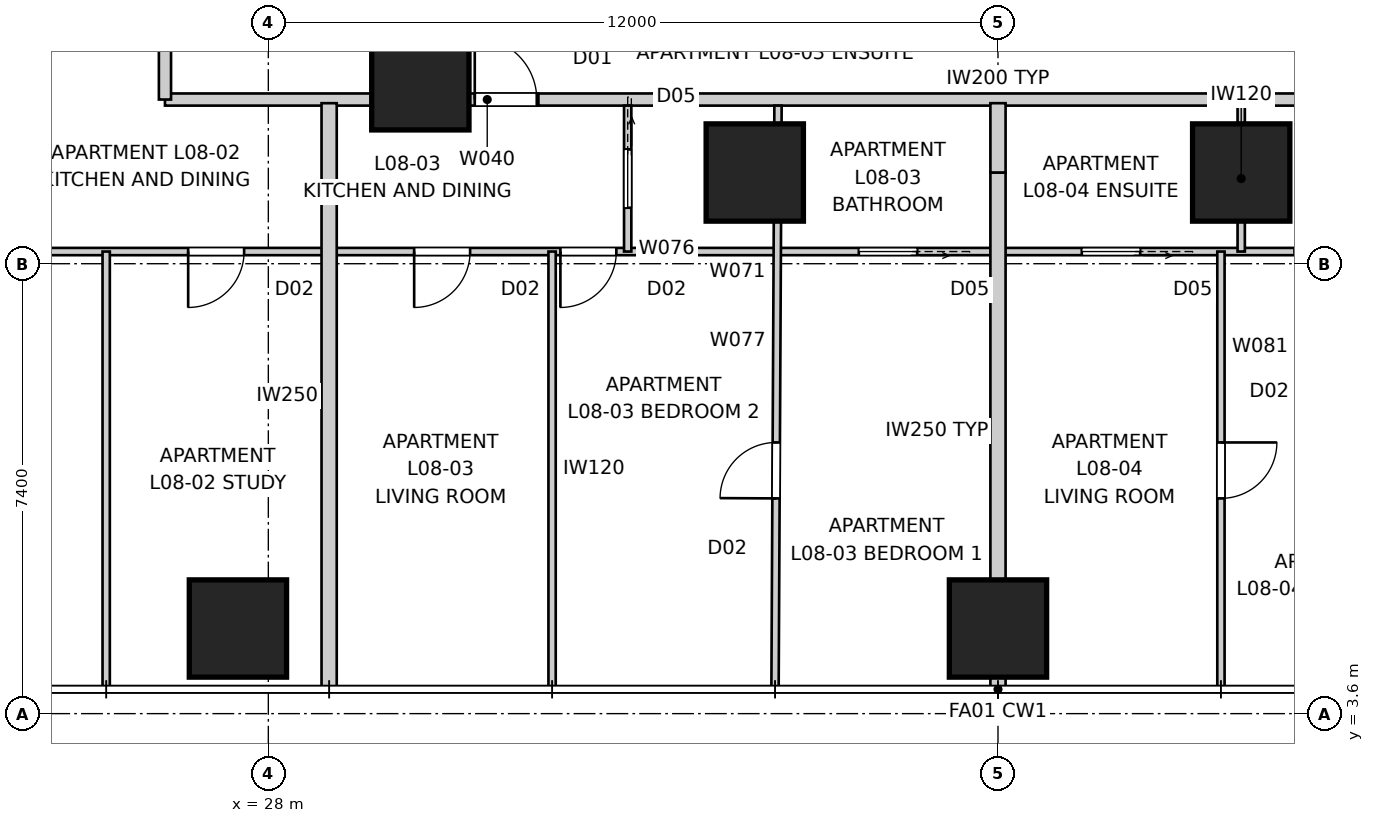
"""IFC4 building model, lengths in metres.
Left out: names, types, materials, properties, quantities, classifications, styles, units other than length and angle.
Written with IfcOpenShell. Run it as: python <this file> out.ifc"""

import sys

from ifc_helpers import new_model, si_unit, direction, frame, frame_2d, origin, origin_2d, place, context, subcontext, project, spatial, rectangle, extrude, element, fill, save


model = new_model("IFC4")
c1 = context("Model", 3, precision=1e-05, world=origin(), true_north=direction((0.0, 1.0)))
c2 = subcontext(c1, "Body", "Model", "MODEL_VIEW")
j1 = project(units=[si_unit("LENGTHUNIT", "METRE"), si_unit("PLANEANGLEUNIT", "RADIAN")], contexts=[c1])
p1 = place(None, origin())
s1 = spatial("IfcSite", under=j1, at=p1, CompositionType="ELEMENT")
p2 = place(p1, origin())
s2 = spatial("IfcBuilding", under=s1, at=p2, CompositionType="ELEMENT")
p3 = place(p2, frame((0.0, 0.0, 32.0)))
s3 = spatial("IfcBuildingStorey", under=s2, at=p3, CompositionType="ELEMENT", Elevation=32.0)
for number, where, z_axis, x_axis in (
    (1, (27.5, 5.0, 0.0), (0.0, 0.0, 1.0), (1.0, 0.0, 0.0)),
    (2, (40.0, 5.0, 0.0), (0.0, 0.0, 1.0), (1.0, 0.0, 0.0)),
    (3, (30.5, 14.0, 0.0), (0.0, 0.0, 1.0), (1.0, 0.0, 0.0)),
    (4, (36.0, 12.5, 0.0), (0.0, 0.0, 1.0), (1.0, 0.0, 0.0)),
    (5, (44.0, 12.5, 0.0), (0.0, 0.0, 1.0), (1.0, 0.0, 0.0)),
):
    element("IfcColumn", number, at=place(p3, frame(where, z_axis=z_axis, x_axis=x_axis)), inside=s3, PredefinedType="COLUMN", context=c2, shape_type="SweptSolid", body=[
        extrude(rectangle(XDim=1.6, YDim=1.6, at=origin_2d()), origin(), (0.0, 0.0, 1.0), 3.4),
    ])
p4 = place(p3, frame((26.3, 13.7, 0.0), z_axis=(0.0, 0.0, 1.0), x_axis=(1.0, 0.0, 0.0)))
e6 = element("IfcWall", 6, at=p4, inside=s3, PredefinedType="PARTITIONING", context=c2, shape_type="SweptSolid", body=[
    extrude(rectangle(XDim=4.458, YDim=0.2, at=frame_2d((2.229, 0.0))), origin(), (0.0, 0.0, 1.0), 3.25),
])
p5 = place(p3, frame((30.758, 13.7, 0.0), z_axis=(0.0, 0.0, 1.0), x_axis=(1.0, 0.0, 0.0)))
e7 = element("IfcWall", 7, at=p5, inside=s3, PredefinedType="PARTITIONING", context=c2, shape_type="SweptSolid", body=[
    extrude(rectangle(XDim=1.683, YDim=0.2, at=frame_2d((0.842, 0.0))), origin(), (0.0, 0.0, 1.0), 2.55),
])
p6 = place(p5, frame((0.637, 0.0, 0.0)))
e8 = element("IfcOpeningElement", 8, at=p6, cuts=e7, PredefinedType="OPENING", context=c2, shape_type="SweptSolid", body=[
    extrude(rectangle(XDim=1.02, YDim=2.34, at=frame_2d((0.51, 1.17))), frame((0.0, 0.11, 0.0), z_axis=(0.0, -1.0, 0.0), x_axis=(1.0, 0.0, 0.0)), (0.0, 0.0, 1.0), 0.22),
])
p7 = place(p3, frame((32.442, 13.7, 0.0), z_axis=(0.0, 0.0, 1.0), x_axis=(1.0, 0.0, 0.0)))
e9 = element("IfcWall", 9, at=p7, inside=s3, PredefinedType="PARTITIONING", context=c2, shape_type="SweptSolid", body=[
    extrude(rectangle(XDim=15.117, YDim=0.2, at=frame_2d((7.558, 0.0))), origin(), (0.0, 0.0, 1.0), 3.25),
])
p8 = place(p3, frame((26.3, 46.3, 0.0), z_axis=(0.0, 0.0, 1.0), x_axis=(0.0, -1.0, 0.0)))
e10 = element("IfcWall", 10, at=p8, inside=s3, PredefinedType="PARTITIONING", context=c2, shape_type="SweptSolid", body=[
    extrude(rectangle(XDim=32.6, YDim=0.2, at=frame_2d((16.3, 0.0))), origin(), (0.0, 0.0, 1.0), 3.25),
])
p9 = place(p8, frame((2.315, 0.0, 0.0)))
e11 = element("IfcOpeningElement", 11, at=p9, cuts=e10, PredefinedType="OPENING", context=c2, shape_type="SweptSolid", body=[
    extrude(rectangle(XDim=1.02, YDim=2.34, at=frame_2d((0.51, 1.17))), frame((0.0, 0.11, 0.0), z_axis=(0.0, -1.0, 0.0), x_axis=(1.0, 0.0, 0.0)), (0.0, 0.0, 1.0), 0.22),
])
p10 = place(p8, frame((10.624, 0.0, 0.0)))
e12 = element("IfcOpeningElement", 12, at=p10, cuts=e10, PredefinedType="OPENING", context=c2, shape_type="SweptSolid", body=[
    extrude(rectangle(XDim=1.02, YDim=2.34, at=frame_2d((0.51, 1.17))), frame((0.0, 0.11, 0.0), z_axis=(0.0, -1.0, 0.0), x_axis=(1.0, 0.0, 0.0)), (0.0, 0.0, 1.0), 0.22),
])
p11 = place(p8, frame((17.848, 0.0, 0.0)))
e13 = element("IfcOpeningElement", 13, at=p11, cuts=e10, PredefinedType="OPENING", context=c2, shape_type="SweptSolid", body=[
    extrude(rectangle(XDim=1.02, YDim=2.34, at=frame_2d((0.51, 1.17))), frame((0.0, 0.11, 0.0), z_axis=(0.0, -1.0, 0.0), x_axis=(1.0, 0.0, 0.0)), (0.0, 0.0, 1.0), 0.22),
])
p12 = place(p8, frame((30.516, 0.0, 0.0)))
e14 = element("IfcOpeningElement", 14, at=p12, cuts=e10, PredefinedType="OPENING", context=c2, shape_type="SweptSolid", body=[
    extrude(rectangle(XDim=1.02, YDim=2.34, at=frame_2d((0.51, 1.17))), frame((0.0, 0.11, 0.0), z_axis=(0.0, -1.0, 0.0), x_axis=(1.0, 0.0, 0.0)), (0.0, 0.0, 1.0), 0.22),
])
p13 = place(p3, frame((29.0, 4.0, 0.0), z_axis=(0.0, 0.0, 1.0), x_axis=(0.0, 1.0, 0.0)))
e15 = element("IfcWall", 15, at=p13, inside=s3, PredefinedType="PARTITIONING", context=c2, shape_type="SweptSolid", body=[
    extrude(rectangle(XDim=9.64, YDim=0.25, at=frame_2d((4.82, 0.0))), origin(), (0.0, 0.0, 1.0), 3.25),
])
p14 = place(p3, frame((40.0, 4.0, 0.0), z_axis=(0.0, 0.0, 1.0), x_axis=(0.0, 1.0, 0.0)))
e16 = element("IfcWall", 16, at=p14, inside=s3, PredefinedType="PARTITIONING", context=c2, shape_type="SweptSolid", body=[
    extrude(rectangle(XDim=8.5, YDim=0.25, at=frame_2d((4.25, 0.0))), origin(), (0.0, 0.0, 1.0), 3.25),
])
p15 = place(p3, frame((40.0, 12.5, 0.0), z_axis=(0.0, 0.0, 1.0), x_axis=(0.0, 1.0, 0.0)))
e17 = element("IfcWall", 17, at=p15, inside=s3, PredefinedType="PARTITIONING", context=c2, shape_type="SweptSolid", body=[
    extrude(rectangle(XDim=1.14, YDim=0.25, at=frame_2d((0.57, 0.0))), origin(), (0.0, 0.0, 1.0), 2.796),
])
p16 = place(p3, frame((54.667, 11.2, 0.0), z_axis=(0.0, 0.0, 1.0), x_axis=(-1.0, 0.0, 0.0)))
e18 = element("IfcWall", 18, at=p16, inside=s3, PredefinedType="PARTITIONING", context=c2, shape_type="SweptSolid", body=[
    extrude(rectangle(XDim=30.867, YDim=0.12, at=frame_2d((15.433, 0.0))), origin(), (0.0, 0.0, 1.0), 3.25),
])
p17 = place(p16, frame((23.348, 0.0, 0.0)))
e19 = element("IfcOpeningElement", 19, at=p17, cuts=e18, PredefinedType="OPENING", context=c2, shape_type="SweptSolid", body=[
    extrude(rectangle(XDim=0.92, YDim=2.34, at=frame_2d((0.46, 1.17))), frame((0.0, 0.07, 0.0), z_axis=(0.0, -1.0, 0.0), x_axis=(1.0, 0.0, 0.0)), (0.0, 0.0, 1.0), 0.14),
])
p18 = place(p16, frame((20.943, 0.0, 0.0)))
e20 = element("IfcOpeningElement", 20, at=p18, cuts=e18, PredefinedType="OPENING", context=c2, shape_type="SweptSolid", body=[
    extrude(rectangle(XDim=0.92, YDim=2.34, at=frame_2d((0.46, 1.17))), frame((0.0, 0.07, 0.0), z_axis=(0.0, -1.0, 0.0), x_axis=(1.0, 0.0, 0.0)), (0.0, 0.0, 1.0), 0.14),
])
p19 = place(p16, frame((5.065, 0.0, 0.0)))
e21 = element("IfcOpeningElement", 21, at=p19, cuts=e18, PredefinedType="OPENING", context=c2, shape_type="SweptSolid", body=[
    extrude(rectangle(XDim=0.92, YDim=2.34, at=frame_2d((0.46, 1.17))), frame((0.0, 0.07, 0.0), z_axis=(0.0, -1.0, 0.0), x_axis=(1.0, 0.0, 0.0)), (0.0, 0.0, 1.0), 0.14),
])
p20 = place(p16, frame((27.065, 0.0, 0.0)))
e22 = element("IfcOpeningElement", 22, at=p20, cuts=e18, PredefinedType="OPENING", context=c2, shape_type="SweptSolid", body=[
    extrude(rectangle(XDim=0.92, YDim=2.34, at=frame_2d((0.46, 1.17))), frame((0.0, 0.07, 0.0), z_axis=(0.0, -1.0, 0.0), x_axis=(1.0, 0.0, 0.0)), (0.0, 0.0, 1.0), 0.14),
])
p21 = place(p16, frame((1.353, 0.0, 0.0)))
e23 = element("IfcOpeningElement", 23, at=p21, cuts=e18, PredefinedType="OPENING", context=c2, shape_type="SweptSolid", body=[
    extrude(rectangle(XDim=0.96, YDim=2.1, at=frame_2d((0.48, 1.05))), frame((0.0, 0.07, 0.0), z_axis=(0.0, -1.0, 0.0), x_axis=(1.0, 0.0, 0.0)), (0.0, 0.0, 1.0), 0.14),
])
p22 = place(p16, frame((8.83, 0.0, 0.0)))
e24 = element("IfcOpeningElement", 24, at=p22, cuts=e18, PredefinedType="OPENING", context=c2, shape_type="SweptSolid", body=[
    extrude(rectangle(XDim=0.96, YDim=2.1, at=frame_2d((0.48, 1.05))), frame((0.0, 0.07, 0.0), z_axis=(0.0, -1.0, 0.0), x_axis=(1.0, 0.0, 0.0)), (0.0, 0.0, 1.0), 0.14),
])
p23 = place(p16, frame((12.328, 0.0, 0.0)))
e25 = element("IfcOpeningElement", 25, at=p23, cuts=e18, PredefinedType="OPENING", context=c2, shape_type="SweptSolid", body=[
    extrude(rectangle(XDim=0.96, YDim=2.1, at=frame_2d((0.48, 1.05))), frame((0.0, 0.07, 0.0), z_axis=(0.0, -1.0, 0.0), x_axis=(1.0, 0.0, 0.0)), (0.0, 0.0, 1.0), 0.14),
])
p24 = place(p16, frame((15.996, 0.0, 0.0)))
e26 = element("IfcOpeningElement", 26, at=p24, cuts=e18, PredefinedType="OPENING", context=c2, shape_type="SweptSolid", body=[
    extrude(rectangle(XDim=0.96, YDim=2.1, at=frame_2d((0.48, 1.05))), frame((0.0, 0.07, 0.0), z_axis=(0.0, -1.0, 0.0), x_axis=(1.0, 0.0, 0.0)), (0.0, 0.0, 1.0), 0.14),
])
p25 = place(p3, frame((25.333, 11.2, 0.0), z_axis=(0.0, 0.0, 1.0), x_axis=(0.0, -1.0, 0.0)))
e27 = element("IfcWall", 27, at=p25, inside=s3, PredefinedType="PARTITIONING", context=c2, shape_type="SweptSolid", body=[
    extrude(rectangle(XDim=7.16, YDim=0.12, at=frame_2d((3.58, 0.0))), origin(), (0.0, 0.0, 1.0), 2.638),
])
p26 = place(p3, frame((33.91, 13.6, 0.0), z_axis=(0.0, 0.0, 1.0), x_axis=(0.0, -1.0, 0.0)))
e28 = element("IfcWall", 28, at=p26, inside=s3, PredefinedType="PARTITIONING", context=c2, shape_type="SweptSolid", body=[
    extrude(rectangle(XDim=2.4, YDim=0.12, at=frame_2d((1.2, 0.0))), origin(), (0.0, 0.0, 1.0), 3.25),
])
p27 = place(p26, frame((0.72, 0.0, 0.0)))
e29 = element("IfcOpeningElement", 29, at=p27, cuts=e28, PredefinedType="OPENING", context=c2, shape_type="SweptSolid", body=[
    extrude(rectangle(XDim=0.96, YDim=2.1, at=frame_2d((0.48, 1.05))), frame((0.0, 0.07, 0.0), z_axis=(0.0, -1.0, 0.0), x_axis=(1.0, 0.0, 0.0)), (0.0, 0.0, 1.0), 0.14),
])
p28 = place(p3, frame((36.333, 4.04, 0.0), z_axis=(0.0, 0.0, 1.0), x_axis=(0.005107446534, 0.99998695691, 0.0)))
e30 = element("IfcWall", 30, at=p28, inside=s3, PredefinedType="PARTITIONING", context=c2, shape_type="SweptSolid", body=[
    extrude(rectangle(XDim=9.56, YDim=0.12, at=frame_2d((4.78, 0.0))), origin(), (0.0, 0.0, 1.0), 3.25),
])
p29 = place(p28, frame((3.1, 0.0, 0.0)))
e31 = element("IfcOpeningElement", 31, at=p29, cuts=e30, PredefinedType="OPENING", context=c2, shape_type="SweptSolid", body=[
    extrude(rectangle(XDim=0.92, YDim=2.34, at=frame_2d((0.46, 1.17))), frame((0.0, 0.07, 0.0), z_axis=(0.0, -1.0, 0.0), x_axis=(1.0, 0.0, 0.0)), (0.0, 0.0, 1.0), 0.14),
])
p30 = place(p3, frame((32.667, 11.2, 0.0), z_axis=(0.0, 0.0, 1.0), x_axis=(0.0, -1.0, 0.0)))
e32 = element("IfcWall", 32, at=p30, inside=s3, PredefinedType="PARTITIONING", context=c2, shape_type="SweptSolid", body=[
    extrude(rectangle(XDim=7.16, YDim=0.12, at=frame_2d((3.58, 0.0))), origin(), (0.0, 0.0, 1.0), 3.25),
])
p31 = place(p3, frame((44.0, 11.2, 0.0), z_axis=(0.0, 0.0, 1.0), x_axis=(0.0, 1.0, 0.0)))
e33 = element("IfcWall", 33, at=p31, inside=s3, PredefinedType="PARTITIONING", context=c2, shape_type="SweptSolid", body=[
    extrude(rectangle(XDim=2.4, YDim=0.12, at=frame_2d((1.2, 0.0))), origin(), (0.0, 0.0, 1.0), 3.25),
])
p32 = place(p3, frame((43.667, 11.2, 0.0), z_axis=(0.0, 0.0, 1.0), x_axis=(0.0, -1.0, 0.0)))
e34 = element("IfcWall", 34, at=p32, inside=s3, PredefinedType="PARTITIONING", context=c2, shape_type="SweptSolid", body=[
    extrude(rectangle(XDim=7.16, YDim=0.12, at=frame_2d((3.58, 0.0))), origin(), (0.0, 0.0, 1.0), 3.25),
])
p33 = place(p32, frame((3.14, 0.0, 0.0)))
e35 = element("IfcOpeningElement", 35, at=p33, cuts=e34, PredefinedType="OPENING", context=c2, shape_type="SweptSolid", body=[
    extrude(rectangle(XDim=0.92, YDim=2.34, at=frame_2d((0.46, 1.17))), frame((0.0, 0.07, 0.0), z_axis=(0.0, -1.0, 0.0), x_axis=(1.0, 0.0, 0.0)), (0.0, 0.0, 1.0), 0.14),
])
p34 = place(p6, origin())
e36 = element("IfcDoor", 36, at=p34, inside=s3, OperationType="SINGLE_SWING_LEFT", PredefinedType="DOOR", context=c2, shape_type="SweptSolid", body=[
    extrude(rectangle(XDim=1.02, YDim=2.34, at=frame_2d((0.51, 1.17))), frame((0.0, 0.025, 0.0), z_axis=(0.0, -1.0, 0.0), x_axis=(1.0, 0.0, 0.0)), (0.0, 0.0, 1.0), 0.05),
])
fill(e8, e36)
p35 = place(p17, origin())
e37 = element("IfcDoor", 37, at=p35, inside=s3, OperationType="SINGLE_SWING_RIGHT", PredefinedType="DOOR", context=c2, shape_type="SweptSolid", body=[
    extrude(rectangle(XDim=0.92, YDim=2.34, at=frame_2d((0.46, 1.17))), frame((0.0, 0.025, 0.0), z_axis=(0.0, -1.0, 0.0), x_axis=(1.0, 0.0, 0.0)), (0.0, 0.0, 1.0), 0.05),
])
fill(e19, e37)
p36 = place(p27, origin())
e38 = element("IfcDoor", 38, at=p36, inside=s3, OperationType="SLIDING_TO_LEFT", PredefinedType="DOOR", context=c2, shape_type="SweptSolid", body=[
    extrude(rectangle(XDim=0.96, YDim=2.1, at=frame_2d((0.48, 1.05))), frame((0.0, 0.025, 0.0), z_axis=(0.0, -1.0, 0.0), x_axis=(1.0, 0.0, 0.0)), (0.0, 0.0, 1.0), 0.05),
])
fill(e29, e38)
p37 = place(p18, origin())
e39 = element("IfcDoor", 39, at=p37, inside=s3, OperationType="SINGLE_SWING_RIGHT", PredefinedType="DOOR", context=c2, shape_type="SweptSolid", body=[
    extrude(rectangle(XDim=0.92, YDim=2.34, at=frame_2d((0.46, 1.17))), frame((0.0, 0.025, 0.0), z_axis=(0.0, -1.0, 0.0), x_axis=(1.0, 0.0, 0.0)), (0.0, 0.0, 1.0), 0.05),
])
fill(e20, e39)
p38 = place(p20, origin())
e40 = element("IfcDoor", 40, at=p38, inside=s3, OperationType="SINGLE_SWING_RIGHT", PredefinedType="DOOR", context=c2, shape_type="SweptSolid", body=[
    extrude(rectangle(XDim=0.92, YDim=2.34, at=frame_2d((0.46, 1.17))), frame((0.0, 0.025, 0.0), z_axis=(0.0, -1.0, 0.0), x_axis=(1.0, 0.0, 0.0)), (0.0, 0.0, 1.0), 0.05),
])
fill(e22, e40)
p39 = place(p22, origin())
e41 = element("IfcDoor", 41, at=p39, inside=s3, OperationType="SLIDING_TO_LEFT", PredefinedType="DOOR", context=c2, shape_type="SweptSolid", body=[
    extrude(rectangle(XDim=0.96, YDim=2.1, at=frame_2d((0.48, 1.05))), frame((0.0, 0.025, 0.0), z_axis=(0.0, -1.0, 0.0), x_axis=(1.0, 0.0, 0.0)), (0.0, 0.0, 1.0), 0.05),
])
fill(e24, e41)
p40 = place(p29, origin())
e42 = element("IfcDoor", 42, at=p40, inside=s3, OperationType="SINGLE_SWING_LEFT", PredefinedType="DOOR", context=c2, shape_type="SweptSolid", body=[
    extrude(rectangle(XDim=0.92, YDim=2.34, at=frame_2d((0.46, 1.17))), frame((0.0, 0.025, 0.0), z_axis=(0.0, -1.0, 0.0), x_axis=(1.0, 0.0, 0.0)), (0.0, 0.0, 1.0), 0.05),
])
fill(e31, e42)
p41 = place(p33, origin())
e43 = element("IfcDoor", 43, at=p41, inside=s3, OperationType="SINGLE_SWING_LEFT", PredefinedType="DOOR", context=c2, shape_type="SweptSolid", body=[
    extrude(rectangle(XDim=0.92, YDim=2.34, at=frame_2d((0.46, 1.17))), frame((0.0, 0.025, 0.0), z_axis=(0.0, -1.0, 0.0), x_axis=(1.0, 0.0, 0.0)), (0.0, 0.0, 1.0), 0.05),
])
fill(e35, e43)
p42 = place(p23, origin())
e44 = element("IfcDoor", 44, at=p42, inside=s3, OperationType="SLIDING_TO_LEFT", PredefinedType="DOOR", context=c2, shape_type="SweptSolid", body=[
    extrude(rectangle(XDim=0.96, YDim=2.1, at=frame_2d((0.48, 1.05))), frame((0.0, 0.025, 0.0), z_axis=(0.0, -1.0, 0.0), x_axis=(1.0, 0.0, 0.0)), (0.0, 0.0, 1.0), 0.05),
])
fill(e25, e44)
p43 = place(p24, origin())
e45 = element("IfcDoor", 45, at=p43, inside=s3, OperationType="SLIDING_TO_LEFT", PredefinedType="DOOR", context=c2, shape_type="SweptSolid", body=[
    extrude(rectangle(XDim=0.96, YDim=2.1, at=frame_2d((0.48, 1.05))), frame((0.0, 0.025, 0.0), z_axis=(0.0, -1.0, 0.0), x_axis=(1.0, 0.0, 0.0)), (0.0, 0.0, 1.0), 0.05),
])
fill(e26, e45)
save(model, sys.argv[1])
